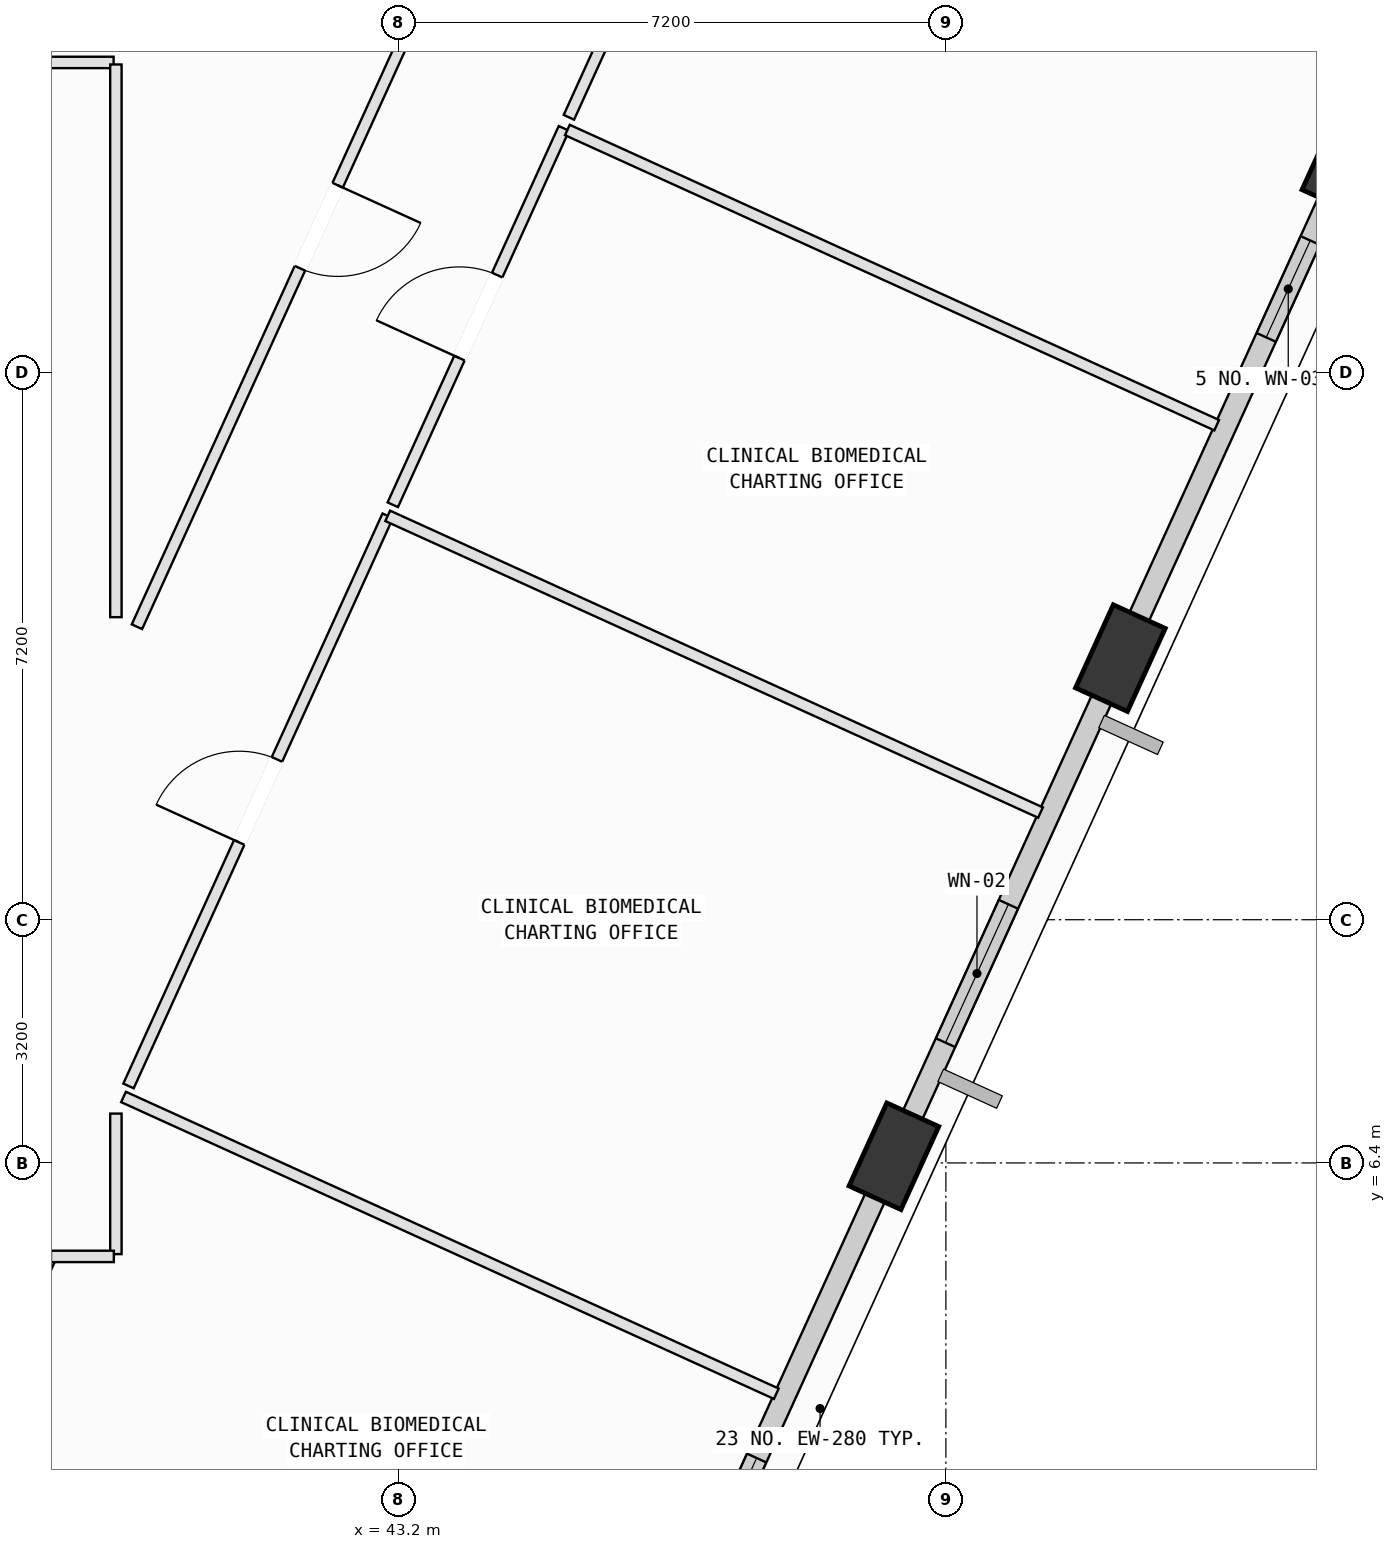
"""IFC4 building model, lengths in metres.
Left out: names, types, materials, properties, quantities, classifications, styles, units other than length and angle.
Written with IfcOpenShell. Run it as: python <this file> out.ifc"""

import sys

from ifc_helpers import new_model, si_unit, direction, frame, frame_2d, origin, origin_2d, place, context, subcontext, project, spatial, rectangle, extrude, element, fill, save


model = new_model("IFC4")
c1 = context("Model", 3, precision=1e-05, world=origin(), true_north=direction((0.0, 1.0)))
c2 = subcontext(c1, "Body", "Model", "MODEL_VIEW")
j1 = project(units=[si_unit("LENGTHUNIT", "METRE"), si_unit("PLANEANGLEUNIT", "RADIAN")], contexts=[c1])
p1 = place(None, origin())
s1 = spatial("IfcSite", under=j1, at=p1, CompositionType="ELEMENT")
p2 = place(p1, origin())
s2 = spatial("IfcBuilding", under=s1, at=p2, CompositionType="ELEMENT")
p3 = place(p2, frame((0.0, 0.0, 304.6)))
s3 = spatial("IfcBuildingStorey", under=s2, at=p3, CompositionType="ELEMENT", Elevation=304.6)
p4 = place(p3, frame((49.716, 6.488, 0.002), z_axis=(0.074943011084, 0.06708358713, 0.994928810231), x_axis=(-0.950891346465, -0.295672274925, 0.091561744516)))
e1 = element("IfcColumn", 1, at=p4, inside=s3, PredefinedType="COLUMN", context=c2, shape_type="SweptSolid", body=[
    extrude(rectangle(XDim=1.2, YDim=0.75, at=origin_2d()), origin(), (0.0, 0.0, 1.0), 3.945),
])
p5 = place(p3, frame((52.696, 13.042, 0.002), z_axis=(0.047868145988, 0.079223636965, 0.995706912673), x_axis=(-0.823003886966, -0.561751385032, 0.084261399549)))
e2 = element("IfcColumn", 2, at=p5, inside=s3, PredefinedType="COLUMN", context=c2, shape_type="SweptSolid", body=[
    extrude(rectangle(XDim=1.2, YDim=0.75, at=origin_2d()), origin(), (0.0, 0.0, 1.0), 3.948),
])
p6 = place(p3, frame((55.676, 19.596, 0.002), z_axis=(0.020720058133, 0.091230106706, 0.995614256036), x_axis=(-0.604352384833, -0.792152328195, 0.085163864882)))
e3 = element("IfcColumn", 3, at=p6, inside=s3, PredefinedType="COLUMN", context=c2, shape_type="SweptSolid", body=[
    extrude(rectangle(XDim=1.2, YDim=0.75, at=origin_2d()), origin(), (0.0, 0.0, 1.0), 3.947),
])
p7 = place(p3, frame((49.631, 6.302, 0.0), z_axis=(0.0, 0.0, 1.0), x_axis=(-0.413905785978, -0.910319724236, 0.0)))
e4 = element("IfcWall", 4, at=p7, inside=s3, PredefinedType="SOLIDWALL", context=c2, shape_type="SweptSolid", body=[
    extrude(rectangle(XDim=6.439, YDim=0.28, at=frame_2d((3.219, 0.0))), origin(), (0.0, 0.0, 1.0), 3.265),
])
p8 = place(p7, frame((4.158, 0.0, 0.75)))
e5 = element("IfcOpeningElement", 5, at=p8, cuts=e4, PredefinedType="OPENING", context=c2, shape_type="SweptSolid", body=[
    extrude(rectangle(XDim=1.6, YDim=1.95, at=frame_2d((0.8, 0.975))), frame((0.0, 0.15, 0.0), z_axis=(0.0, -1.0, 0.0), x_axis=(1.0, 0.0, 0.0)), (0.0, 0.0, 1.0), 0.3),
])
p9 = place(p3, frame((52.608, 12.849, 0.0), z_axis=(0.0, 0.0, 1.0), x_axis=(-0.413897586978, -0.910323452128, 0.0)))
e6 = element("IfcWall", 6, at=p9, inside=s3, PredefinedType="SOLIDWALL", context=c2, shape_type="SweptSolid", body=[
    extrude(rectangle(XDim=6.414, YDim=0.28, at=frame_2d((3.207, 0.0))), origin(), (0.0, 0.0, 1.0), 3.265),
])
p10 = place(p9, frame((3.346, 0.0, 0.75)))
e7 = element("IfcOpeningElement", 7, at=p10, cuts=e6, PredefinedType="OPENING", context=c2, shape_type="SweptSolid", body=[
    extrude(rectangle(XDim=2.0, YDim=1.95, at=frame_2d((1.0, 0.975))), frame((0.0, 0.15, 0.0), z_axis=(0.0, -1.0, 0.0), x_axis=(1.0, 0.0, 0.0)), (0.0, 0.0, 1.0), 0.3),
])
p11 = place(p3, frame((55.588, 19.404, 0.0), z_axis=(0.0, 0.0, 1.0), x_axis=(-0.413909168945, -0.910318186055, 0.0)))
e8 = element("IfcWall", 8, at=p11, inside=s3, PredefinedType="SOLIDWALL", context=c2, shape_type="SweptSolid", body=[
    extrude(rectangle(XDim=6.407, YDim=0.28, at=frame_2d((3.203, 0.0))), origin(), (0.0, 0.0, 1.0), 3.265),
])
p12 = place(p11, frame((0.952, 0.0, 0.75)))
e9 = element("IfcOpeningElement", 9, at=p12, cuts=e8, PredefinedType="OPENING", context=c2, shape_type="SweptSolid", body=[
    extrude(rectangle(XDim=1.4, YDim=1.85, at=frame_2d((0.7, 0.925))), frame((0.0, 0.15, 0.0), z_axis=(0.0, -1.0, 0.0), x_axis=(1.0, 0.0, 0.0)), (0.0, 0.0, 1.0), 0.3),
])
p13 = place(p3, frame((39.48, 5.2, 0.0), z_axis=(0.0, 0.0, 1.0), x_axis=(0.0, 1.0, 0.0)))
e10 = element("IfcWall", 10, at=p13, inside=s3, PredefinedType="PARTITIONING", context=c2, shape_type="SweptSolid", body=[
    extrude(rectangle(XDim=1.849, YDim=0.15, at=frame_2d((0.925, 0.0))), origin(), (0.0, 0.0, 1.0), 3.78),
])
p14 = place(p3, frame((39.58, 7.268, 0.0), z_axis=(0.0, 0.0, 1.0), x_axis=(0.910326595448, -0.413890673513, 0.0)))
e11 = element("IfcWall", 11, at=p14, inside=s3, PredefinedType="PARTITIONING", context=c2, shape_type="SweptSolid", body=[
    extrude(rectangle(XDim=9.435, YDim=0.15, at=frame_2d((4.717, 0.0))), origin(), (0.0, 0.0, 1.0), 2.765),
])
p15 = place(p3, frame((37.328, 2.316, 0.0), z_axis=(0.0, 0.0, 1.0), x_axis=(0.414020000743, 0.910267784218, 0.0)))
e12 = element("IfcWall", 12, at=p15, inside=s3, PredefinedType="PARTITIONING", context=c2, shape_type="SweptSolid", body=[
    extrude(rectangle(XDim=3.135, YDim=0.15, at=frame_2d((1.568, 0.0))), origin(), (0.0, 0.0, 1.0), 3.78),
])
p16 = place(p15, frame((0.968, 0.0, 0.0)))
e13 = element("IfcOpeningElement", 13, at=p16, cuts=e12, PredefinedType="OPENING", context=c2, shape_type="SweptSolid", body=[
    extrude(rectangle(XDim=1.2, YDim=2.15, at=frame_2d((0.6, 1.075))), frame((0.0, 0.085, 0.0), z_axis=(0.0, -1.0, 0.0), x_axis=(1.0, 0.0, 0.0)), (0.0, 0.0, 1.0), 0.17),
])
p17 = place(p3, frame((38.626, 5.17, 0.0), z_axis=(0.0, 0.0, 1.0), x_axis=(1.0, 0.0, 0.0)))
e14 = element("IfcWall", 14, at=p17, inside=s3, PredefinedType="PARTITIONING", context=c2, shape_type="SweptSolid", body=[
    extrude(rectangle(XDim=0.827, YDim=0.15, at=frame_2d((0.414, 0.0))), origin(), (0.0, 0.0, 1.0), 3.78),
])
p18 = place(p3, frame((39.646, 7.413, 0.0), z_axis=(0.0, 0.0, 1.0), x_axis=(0.413840894574, 0.910349226384, 0.0)))
e15 = element("IfcWall", 15, at=p18, inside=s3, PredefinedType="PARTITIONING", context=c2, shape_type="SweptSolid", body=[
    extrude(rectangle(XDim=8.24, YDim=0.15, at=frame_2d((4.12, 0.0))), origin(), (0.0, 0.0, 1.0), 3.78),
])
p19 = place(p18, frame((3.52, 0.0, 0.0)))
e16 = element("IfcOpeningElement", 16, at=p19, cuts=e15, PredefinedType="OPENING", context=c2, shape_type="SweptSolid", body=[
    extrude(rectangle(XDim=1.2, YDim=2.15, at=frame_2d((0.6, 1.075))), frame((0.0, 0.085, 0.0), z_axis=(0.0, -1.0, 0.0), x_axis=(1.0, 0.0, 0.0)), (0.0, 0.0, 1.0), 0.17),
])
p20 = place(p3, frame((43.056, 14.914, 0.0), z_axis=(0.0, 0.0, 1.0), x_axis=(0.91037002219, -0.413795145813, 0.0)))
e17 = element("IfcWall", 17, at=p20, inside=s3, PredefinedType="PARTITIONING", context=c2, shape_type="SweptSolid", body=[
    extrude(rectangle(XDim=9.435, YDim=0.15, at=frame_2d((4.717, 0.0))), origin(), (0.0, 0.0, 1.0), 3.78),
])
p21 = place(p3, frame((50.163, 6.915, 0.0), z_axis=(0.0, 0.0, 1.0), x_axis=(-0.41401577357, -0.910269706864, 0.0)))
e18 = element("IfcWall", 18, at=p21, inside=s3, PredefinedType="PARTITIONING", context=c2, shape_type="SweptSolid", body=[
    extrude(rectangle(XDim=0.778, YDim=0.15, at=frame_2d((0.389, 0.0))), origin(), (0.0, 0.0, 1.0), 3.265),
])
p22 = place(p3, frame((43.123, 15.06, 0.0), z_axis=(0.0, 0.0, 1.0), x_axis=(0.413819852152, 0.910358791887, 0.0)))
e19 = element("IfcWall", 19, at=p22, inside=s3, PredefinedType="PARTITIONING", context=c2, shape_type="SweptSolid", body=[
    extrude(rectangle(XDim=5.439, YDim=0.15, at=frame_2d((2.72, 0.0))), origin(), (0.0, 0.0, 1.0), 3.78),
])
p23 = place(p22, frame((2.12, 0.0, 0.0)))
e20 = element("IfcOpeningElement", 20, at=p23, cuts=e19, PredefinedType="OPENING", context=c2, shape_type="SweptSolid", body=[
    extrude(rectangle(XDim=1.2, YDim=2.15, at=frame_2d((0.6, 1.075))), frame((0.0, 0.085, 0.0), z_axis=(0.0, -1.0, 0.0), x_axis=(1.0, 0.0, 0.0)), (0.0, 0.0, 1.0), 0.17),
])
p24 = place(p3, frame((45.42, 19.991, 0.0), z_axis=(0.0, 0.0, 1.0), x_axis=(0.910331727625, -0.413879385425, 0.0)))
e21 = element("IfcWall", 21, at=p24, inside=s3, PredefinedType="PARTITIONING", context=c2, shape_type="SweptSolid", body=[
    extrude(rectangle(XDim=9.385, YDim=0.15, at=frame_2d((4.692, 0.0))), origin(), (0.0, 0.0, 1.0), 3.78),
])
p25 = place(p3, frame((53.146, 13.476, 0.0), z_axis=(0.0, 0.0, 1.0), x_axis=(-0.412945607797, -0.910755688976, 0.0)))
e22 = element("IfcWall", 22, at=p25, inside=s3, PredefinedType="PARTITIONING", context=c2, shape_type="SweptSolid", body=[
    extrude(rectangle(XDim=0.794, YDim=0.15, at=frame_2d((0.397, 0.0))), origin(), (0.0, 0.0, 1.0), 3.265),
])
p26 = place(p3, frame((45.44, 20.158, 0.0), z_axis=(0.0, 0.0, 1.0), x_axis=(0.413963660089, 0.910293407713, 0.0)))
e23 = element("IfcWall", 23, at=p26, inside=s3, PredefinedType="PARTITIONING", context=c2, shape_type="SweptSolid", body=[
    extrude(rectangle(XDim=8.24, YDim=0.15, at=frame_2d((4.12, 0.0))), origin(), (0.0, 0.0, 1.0), 3.415),
])
p27 = place(p26, frame((3.52, 0.0, 0.0)))
e24 = element("IfcOpeningElement", 24, at=p27, cuts=e23, PredefinedType="OPENING", context=c2, shape_type="SweptSolid", body=[
    extrude(rectangle(XDim=1.2, YDim=2.15, at=frame_2d((0.6, 1.075))), frame((0.0, 0.085, 0.0), z_axis=(0.0, -1.0, 0.0), x_axis=(1.0, 0.0, 0.0)), (0.0, 0.0, 1.0), 0.17),
])
p28 = place(p3, frame((39.45, 20.88, 0.0), z_axis=(0.0, 0.0, 1.0), x_axis=(-1.0, 0.0, 0.0)))
e25 = element("IfcWall", 25, at=p28, inside=s3, PredefinedType="PARTITIONING", context=c2, shape_type="SweptSolid", body=[
    extrude(rectangle(XDim=6.023, YDim=0.15, at=frame_2d((3.011, 0.0))), origin(), (0.0, 0.0, 1.0), 3.78),
])
p29 = place(p3, frame((44.542, 23.981, 0.0), z_axis=(0.0, 0.0, 1.0), x_axis=(-0.413833170361, -0.910352737739, 0.0)))
e26 = element("IfcWall", 26, at=p29, inside=s3, PredefinedType="PARTITIONING", context=c2, shape_type="SweptSolid", body=[
    extrude(rectangle(XDim=11.562, YDim=0.15, at=frame_2d((5.781, 0.0))), origin(), (0.0, 0.0, 1.0), 3.78),
])
p30 = place(p29, frame((5.181, 0.0, 0.0)))
e27 = element("IfcOpeningElement", 27, at=p30, cuts=e26, PredefinedType="OPENING", context=c2, shape_type="SweptSolid", body=[
    extrude(rectangle(XDim=1.2, YDim=2.15, at=frame_2d((0.6, 1.075))), frame((0.0, 0.085, 0.0), z_axis=(0.0, -1.0, 0.0), x_axis=(1.0, 0.0, 0.0)), (0.0, 0.0, 1.0), 0.17),
])
p31 = place(p3, frame((39.48, 13.581, 0.0), z_axis=(0.0, 0.0, 1.0), x_axis=(0.0, 1.0, 0.0)))
e28 = element("IfcWall", 28, at=p31, inside=s3, PredefinedType="PARTITIONING", context=c2, shape_type="SweptSolid", body=[
    extrude(rectangle(XDim=7.272, YDim=0.15, at=frame_2d((3.636, 0.0))), origin(), (0.0, 0.0, 1.0), 3.78),
])
p32 = place(p8, origin())
e29 = element("IfcWindow", 29, at=p32, inside=s3, PartitioningType="SINGLE_PANEL", PredefinedType="WINDOW", context=c2, shape_type="SweptSolid", body=[
    extrude(rectangle(XDim=1.6, YDim=1.95, at=frame_2d((0.8, 0.975))), frame((0.0, 0.03, 0.0), z_axis=(0.0, -1.0, 0.0), x_axis=(1.0, 0.0, 0.0)), (0.0, 0.0, 1.0), 0.06),
])
fill(e5, e29)
p33 = place(p10, origin())
e30 = element("IfcWindow", 30, at=p33, inside=s3, PartitioningType="SINGLE_PANEL", PredefinedType="WINDOW", context=c2, shape_type="SweptSolid", body=[
    extrude(rectangle(XDim=2.0, YDim=1.95, at=frame_2d((1.0, 0.975))), frame((0.0, 0.03, 0.0), z_axis=(0.0, -1.0, 0.0), x_axis=(1.0, 0.0, 0.0)), (0.0, 0.0, 1.0), 0.06),
])
fill(e7, e30)
p34 = place(p12, origin())
e31 = element("IfcWindow", 31, at=p34, inside=s3, PartitioningType="SINGLE_PANEL", PredefinedType="WINDOW", context=c2, shape_type="SweptSolid", body=[
    extrude(rectangle(XDim=1.4, YDim=1.85, at=frame_2d((0.7, 0.925))), frame((0.0, 0.03, 0.0), z_axis=(0.0, -1.0, 0.0), x_axis=(1.0, 0.0, 0.0)), (0.0, 0.0, 1.0), 0.06),
])
fill(e9, e31)
p35 = place(p19, origin())
e32 = element("IfcDoor", 32, at=p35, inside=s3, OperationType="SINGLE_SWING_LEFT", PredefinedType="DOOR", context=c2, shape_type="SweptSolid", body=[
    extrude(rectangle(XDim=1.2, YDim=2.15, at=frame_2d((0.6, 1.075))), frame((0.0, 0.025, 0.0), z_axis=(0.0, -1.0, 0.0), x_axis=(1.0, 0.0, 0.0)), (0.0, 0.0, 1.0), 0.05),
])
fill(e16, e32)
p36 = place(p23, origin())
e33 = element("IfcDoor", 33, at=p36, inside=s3, OperationType="SINGLE_SWING_LEFT", PredefinedType="DOOR", context=c2, shape_type="SweptSolid", body=[
    extrude(rectangle(XDim=1.2, YDim=2.15, at=frame_2d((0.6, 1.075))), frame((0.0, 0.025, 0.0), z_axis=(0.0, -1.0, 0.0), x_axis=(1.0, 0.0, 0.0)), (0.0, 0.0, 1.0), 0.05),
])
fill(e20, e33)
p37 = place(p30, origin())
e34 = element("IfcDoor", 34, at=p37, inside=s3, OperationType="SINGLE_SWING_LEFT", PredefinedType="DOOR", context=c2, shape_type="SweptSolid", body=[
    extrude(rectangle(XDim=1.2, YDim=2.15, at=frame_2d((0.6, 1.075))), frame((0.0, 0.025, 0.0), z_axis=(0.0, -1.0, 0.0), x_axis=(1.0, 0.0, 0.0)), (0.0, 0.0, 1.0), 0.05),
])
fill(e27, e34)
save(model, sys.argv[1])
